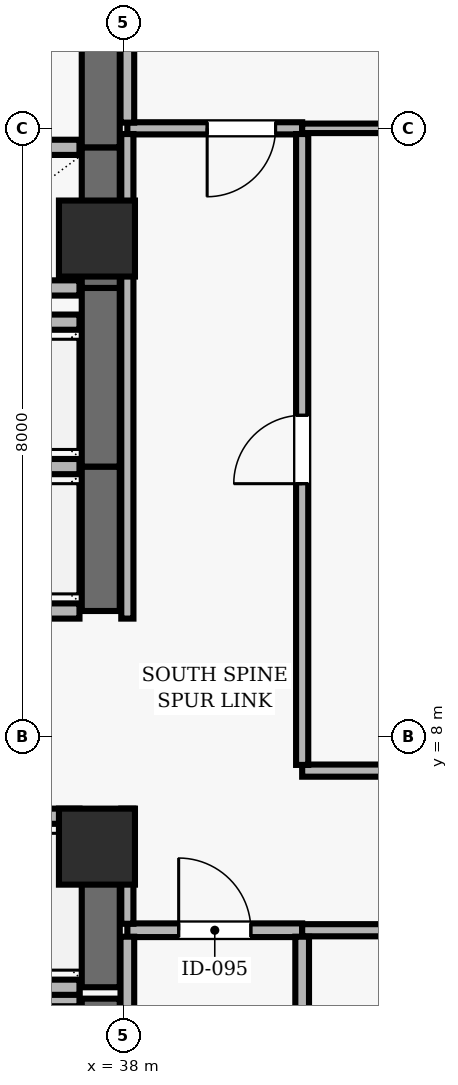
"""IFC4 building model, lengths in metres.
Left out: names, types, materials, properties, quantities, classifications, styles, units other than length and angle.
Written with IfcOpenShell. Run it as: python <this file> out.ifc"""

import sys

from ifc_helpers import new_model, si_unit, direction, frame, frame_2d, origin, origin_2d, place, context, subcontext, project, spatial, rectangle, extrude, element, fill, save


model = new_model("IFC4")
c1 = context("Model", 3, precision=1e-05, world=origin(), true_north=direction((0.0, 1.0)))
c2 = subcontext(c1, "Body", "Model", "MODEL_VIEW")
j1 = project(units=[si_unit("LENGTHUNIT", "METRE"), si_unit("PLANEANGLEUNIT", "RADIAN")], contexts=[c1])
p1 = place(None, origin())
s1 = spatial("IfcSite", under=j1, at=p1, CompositionType="ELEMENT")
p2 = place(p1, origin())
s2 = spatial("IfcBuilding", under=s1, at=p2, CompositionType="ELEMENT")
p3 = place(p2, frame((0.0, 0.0, 203.1)))
s3 = spatial("IfcBuildingStorey", under=s2, at=p3, CompositionType="ELEMENT", Elevation=203.1)
for number, where, z_axis, x_axis in (
    (1, (37.65, 6.55, 0.0), (0.0, 0.0, 1.0), (1.0, 0.0, 0.0)),
    (2, (37.65, 14.55, 0.0), (0.0, 0.0, 1.0), (1.0, 0.0, 0.0)),
):
    element("IfcColumn", number, at=place(p3, frame(where, z_axis=z_axis, x_axis=x_axis)), inside=s3, PredefinedType="COLUMN", context=c2, shape_type="SweptSolid", body=[
        extrude(rectangle(XDim=1.0, YDim=1.0, at=origin_2d()), origin(), (0.0, 0.0, 1.0), 3.9),
    ])
p4 = place(p3, frame((37.7, 2.45, 0.0), z_axis=(0.0, 0.0, 1.0), x_axis=(0.0, 1.0, 0.0)))
e3 = element("IfcWall", 3, at=p4, inside=s3, PredefinedType="SHEAR", context=c2, shape_type="SweptSolid", body=[
    extrude(rectangle(XDim=2.1, YDim=0.5, at=frame_2d((1.05, 0.0))), origin(), (0.0, 0.0, 1.0), 3.69),
])
p5 = place(p3, frame((37.42, 4.55, 0.0), z_axis=(0.0, 0.0, 1.0), x_axis=(-1.0, 0.0, 0.0)))
e4 = element("IfcWall", 4, at=p5, inside=s3, PredefinedType="SOLIDWALL", context=c2, shape_type="SweptSolid", body=[
    extrude(rectangle(XDim=2.14, YDim=0.2, at=frame_2d((1.07, 0.0))), origin(), (0.0, 0.0, 1.0), 3.69),
])
p6 = place(p3, frame((37.7, 4.7, 0.0), z_axis=(0.0, 0.0, 1.0), x_axis=(0.0, 1.0, 0.0)))
e5 = element("IfcWall", 5, at=p6, inside=s3, PredefinedType="SHEAR", context=c2, shape_type="SweptSolid", body=[
    extrude(rectangle(XDim=2.25, YDim=0.5, at=frame_2d((1.125, 0.0))), origin(), (0.0, 0.0, 1.0), 3.69),
])
for number, where, z_axis, x_axis in (
    (6, (35.28, 4.7, 0.0), (0.0, 0.0, 1.0), (1.0, 0.0, 0.0)),
    (7, (37.42, 6.95, 0.0), (0.0, 0.0, 1.0), (-1.0, 0.0, 0.0)),
):
    element("IfcWall", number, at=place(p3, frame(where, z_axis=z_axis, x_axis=x_axis)), inside=s3, PredefinedType="SOLIDWALL", context=c2, shape_type="SweptSolid", body=[
        extrude(rectangle(XDim=2.14, YDim=0.2, at=frame_2d((1.07, 0.0))), origin(), (0.0, 0.0, 1.0), 3.69),
    ])
p7 = place(p3, frame((37.7, 9.65, 0.0), z_axis=(0.0, 0.0, 1.0), x_axis=(0.0, 1.0, 0.0)))
e8 = element("IfcWall", 8, at=p7, inside=s3, PredefinedType="SHEAR", context=c2, shape_type="SweptSolid", body=[
    extrude(rectangle(XDim=1.9, YDim=0.5, at=frame_2d((0.95, 0.0))), origin(), (0.0, 0.0, 1.0), 3.69),
])
for number, where, z_axis, x_axis in (
    (9, (35.28, 9.65, 0.0), (0.0, 0.0, 1.0), (1.0, 0.0, 0.0)),
    (10, (37.42, 11.55, 0.0), (0.0, 0.0, 1.0), (-1.0, 0.0, 0.0)),
):
    element("IfcWall", number, at=place(p3, frame(where, z_axis=z_axis, x_axis=x_axis)), inside=s3, PredefinedType="SOLIDWALL", context=c2, shape_type="SweptSolid", body=[
        extrude(rectangle(XDim=2.14, YDim=0.2, at=frame_2d((1.07, 0.0))), origin(), (0.0, 0.0, 1.0), 3.69),
    ])
p8 = place(p3, frame((37.7, 11.55, 0.0), z_axis=(0.0, 0.0, 1.0), x_axis=(0.0, 1.0, 0.0)))
e11 = element("IfcWall", 11, at=p8, inside=s3, PredefinedType="SHEAR", context=c2, shape_type="SweptSolid", body=[
    extrude(rectangle(XDim=2.35, YDim=0.5, at=frame_2d((1.175, 0.0))), origin(), (0.0, 0.0, 1.0), 3.69),
])
p9 = place(p3, frame((37.42, 13.45, 0.0), z_axis=(0.0, 0.0, 1.0), x_axis=(-1.0, 0.0, 0.0)))
e12 = element("IfcWall", 12, at=p9, inside=s3, PredefinedType="SOLIDWALL", context=c2, shape_type="SweptSolid", body=[
    extrude(rectangle(XDim=2.14, YDim=0.2, at=frame_2d((1.07, 0.0))), origin(), (0.0, 0.0, 1.0), 3.69),
])
p10 = place(p3, frame((37.7, 13.9, 0.0), z_axis=(0.0, 0.0, 1.0), x_axis=(0.0, 1.0, 0.0)))
e13 = element("IfcWall", 13, at=p10, inside=s3, PredefinedType="SHEAR", context=c2, shape_type="SweptSolid", body=[
    extrude(rectangle(XDim=1.85, YDim=0.5, at=frame_2d((0.925, 0.0))), origin(), (0.0, 0.0, 1.0), 3.69),
])
for number, where, z_axis, x_axis in (
    (14, (35.28, 13.9, 0.0), (0.0, 0.0, 1.0), (1.0, 0.0, 0.0)),
    (15, (37.42, 15.75, 0.0), (0.0, 0.0, 1.0), (-1.0, 0.0, 0.0)),
):
    element("IfcWall", number, at=place(p3, frame(where, z_axis=z_axis, x_axis=x_axis)), inside=s3, PredefinedType="SOLIDWALL", context=c2, shape_type="SweptSolid", body=[
        extrude(rectangle(XDim=2.14, YDim=0.2, at=frame_2d((1.07, 0.0))), origin(), (0.0, 0.0, 1.0), 3.69),
    ])
p11 = place(p3, frame((37.7, 15.75, 0.0), z_axis=(0.0, 0.0, 1.0), x_axis=(0.0, 1.0, 0.0)))
e16 = element("IfcWall", 16, at=p11, inside=s3, PredefinedType="SHEAR", context=c2, shape_type="SweptSolid", body=[
    extrude(rectangle(XDim=1.85, YDim=0.5, at=frame_2d((0.925, 0.0))), origin(), (0.0, 0.0, 1.0), 3.69),
])
p12 = place(p3, frame((38.05, 5.45, 0.0), z_axis=(0.0, 0.0, 1.0), x_axis=(1.0, 0.0, 0.0)))
e17 = element("IfcWall", 17, at=p12, inside=s3, PredefinedType="PARTITIONING", context=c2, shape_type="SweptSolid", body=[
    extrude(rectangle(XDim=2.3, YDim=0.18, at=frame_2d((1.15, 0.0))), origin(), (0.0, 0.0, 1.0), 3.372),
])
p13 = place(p12, frame((0.675, 0.0, 0.0)))
e18 = element("IfcOpeningElement", 18, at=p13, cuts=e17, PredefinedType="OPENING", context=c2, shape_type="SweptSolid", body=[
    extrude(rectangle(XDim=0.95, YDim=2.1, at=frame_2d((0.475, 1.05))), frame((0.0, 0.1, 0.0), z_axis=(0.0, -1.0, 0.0), x_axis=(1.0, 0.0, 0.0)), (0.0, 0.0, 1.0), 0.2),
])
p14 = place(p3, frame((40.35, 5.45, 0.0), z_axis=(0.0, 0.0, 1.0), x_axis=(1.0, 0.0, 0.0)))
e19 = element("IfcWall", 19, at=p14, inside=s3, PredefinedType="PARTITIONING", context=c2, shape_type="SweptSolid", body=[
    extrude(rectangle(XDim=5.65, YDim=0.16, at=frame_2d((2.825, 0.0))), origin(), (0.0, 0.0, 1.0), 3.372),
])
p15 = place(p14, frame((2.375, 0.0, 0.0)))
e20 = element("IfcOpeningElement", 20, at=p15, cuts=e19, PredefinedType="OPENING", context=c2, shape_type="SweptSolid", body=[
    extrude(rectangle(XDim=0.9, YDim=2.1, at=frame_2d((0.45, 1.05))), frame((0.0, 0.09, 0.0), z_axis=(0.0, -1.0, 0.0), x_axis=(1.0, 0.0, 0.0)), (0.0, 0.0, 1.0), 0.18),
])
p16 = place(p3, frame((40.35, 16.0, 0.0), z_axis=(0.0, 0.0, 1.0), x_axis=(-1.0, 0.0, 0.0)))
e21 = element("IfcWall", 21, at=p16, inside=s3, PredefinedType="PARTITIONING", context=c2, shape_type="SweptSolid", body=[
    extrude(rectangle(XDim=2.3, YDim=0.16, at=frame_2d((1.15, 0.0))), origin(), (0.0, 0.0, 1.0), 3.39),
])
p17 = place(p16, frame((0.35, 0.0, 0.0)))
e22 = element("IfcOpeningElement", 22, at=p17, cuts=e21, PredefinedType="OPENING", context=c2, shape_type="SweptSolid", body=[
    extrude(rectangle(XDim=0.9, YDim=2.1, at=frame_2d((0.45, 1.05))), frame((0.0, 0.09, 0.0), z_axis=(0.0, -1.0, 0.0), x_axis=(1.0, 0.0, 0.0)), (0.0, 0.0, 1.0), 0.18),
])
p18 = place(p3, frame((46.0, 7.55, 0.0), z_axis=(0.0, 0.0, 1.0), x_axis=(-1.0, 0.0, 0.0)))
e23 = element("IfcWall", 23, at=p18, inside=s3, PredefinedType="PARTITIONING", context=c2, shape_type="SweptSolid", body=[
    extrude(rectangle(XDim=5.65, YDim=0.16, at=frame_2d((2.825, 0.0))), origin(), (0.0, 0.0, 1.0), 3.146),
])
p19 = place(p3, frame((46.0, 16.0, 0.0), z_axis=(0.0, 0.0, 1.0), x_axis=(-1.0, 0.0, 0.0)))
e24 = element("IfcWall", 24, at=p19, inside=s3, PredefinedType="PARTITIONING", context=c2, shape_type="SweptSolid", body=[
    extrude(rectangle(XDim=5.65, YDim=0.125, at=frame_2d((2.825, 0.0))), origin(), (0.0, 0.0, 1.0), 3.39),
])
p20 = place(p3, frame((38.05, 5.365, 0.0), z_axis=(0.0, 0.0, 1.0), x_axis=(0.0, -1.0, 0.0)))
e25 = element("IfcWall", 25, at=p20, inside=s3, PredefinedType="PARTITIONING", context=c2, shape_type="SweptSolid", body=[
    extrude(rectangle(XDim=5.22, YDim=0.18, at=frame_2d((2.61, 0.0))), origin(), (0.0, 0.0, 1.0), 3.146),
])
p21 = place(p3, frame((38.05, 7.05, 0.0), z_axis=(0.0, 0.0, 1.0), x_axis=(0.0, -1.0, 0.0)))
e26 = element("IfcWall", 26, at=p21, inside=s3, PredefinedType="PARTITIONING", context=c2, shape_type="SweptSolid", body=[
    extrude(rectangle(XDim=1.515, YDim=0.16, at=frame_2d((0.758, 0.0))), origin(), (0.0, 0.0, 1.0), 3.146),
])
p22 = place(p3, frame((38.05, 15.925, 0.0), z_axis=(0.0, 0.0, 1.0), x_axis=(0.0, -1.0, 0.0)))
e27 = element("IfcWall", 27, at=p22, inside=s3, PredefinedType="PARTITIONING", context=c2, shape_type="SweptSolid", body=[
    extrude(rectangle(XDim=6.375, YDim=0.16, at=frame_2d((3.188, 0.0))), origin(), (0.0, 0.0, 1.0), 3.146),
])
p23 = place(p3, frame((38.05, 23.19, 0.0), z_axis=(0.0, 0.0, 1.0), x_axis=(0.0, -1.0, 0.0)))
e28 = element("IfcWall", 28, at=p23, inside=s3, PredefinedType="PARTITIONING", context=c2, shape_type="SweptSolid", body=[
    extrude(rectangle(XDim=7.115, YDim=0.18, at=frame_2d((3.558, 0.0))), origin(), (0.0, 0.0, 1.0), 3.146),
])
p24 = place(p3, frame((40.35, 0.145, 0.0), z_axis=(0.0, 0.0, 1.0), x_axis=(0.0, 1.0, 0.0)))
e29 = element("IfcWall", 29, at=p24, inside=s3, PredefinedType="PARTITIONING", context=c2, shape_type="SweptSolid", body=[
    extrude(rectangle(XDim=5.22, YDim=0.18, at=frame_2d((2.61, 0.0))), origin(), (0.0, 0.0, 1.0), 3.69),
])
p25 = place(p3, frame((40.35, 7.625, 0.0), z_axis=(0.0, 0.0, 1.0), x_axis=(0.0, 1.0, 0.0)))
e30 = element("IfcWall", 30, at=p25, inside=s3, PredefinedType="PARTITIONING", context=c2, shape_type="SweptSolid", body=[
    extrude(rectangle(XDim=8.3, YDim=0.16, at=frame_2d((4.15, 0.0))), origin(), (0.0, 0.0, 1.0), 3.372),
])
p26 = place(p25, frame((3.7, 0.0, 0.0)))
e31 = element("IfcOpeningElement", 31, at=p26, cuts=e30, PredefinedType="OPENING", context=c2, shape_type="SweptSolid", body=[
    extrude(rectangle(XDim=0.9, YDim=2.1, at=frame_2d((0.45, 1.05))), frame((0.0, 0.09, 0.0), z_axis=(0.0, -1.0, 0.0), x_axis=(1.0, 0.0, 0.0)), (0.0, 0.0, 1.0), 0.18),
])
p27 = place(p13, origin())
e32 = element("IfcDoor", 32, at=p27, inside=s3, OperationType="SINGLE_SWING_LEFT", PredefinedType="DOOR", context=c2, shape_type="SweptSolid", body=[
    extrude(rectangle(XDim=0.95, YDim=2.1, at=frame_2d((0.475, 1.05))), frame((0.0, 0.025, 0.0), z_axis=(0.0, -1.0, 0.0), x_axis=(1.0, 0.0, 0.0)), (0.0, 0.0, 1.0), 0.05),
])
fill(e18, e32)
p28 = place(p26, origin())
e33 = element("IfcDoor", 33, at=p28, inside=s3, OperationType="SINGLE_SWING_LEFT", PredefinedType="DOOR", context=c2, shape_type="SweptSolid", body=[
    extrude(rectangle(XDim=0.9, YDim=2.1, at=frame_2d((0.45, 1.05))), frame((0.0, 0.025, 0.0), z_axis=(0.0, -1.0, 0.0), x_axis=(1.0, 0.0, 0.0)), (0.0, 0.0, 1.0), 0.05),
])
fill(e31, e33)
p29 = place(p17, origin())
e34 = element("IfcDoor", 34, at=p29, inside=s3, OperationType="SINGLE_SWING_RIGHT", PredefinedType="DOOR", context=c2, shape_type="SweptSolid", body=[
    extrude(rectangle(XDim=0.9, YDim=2.1, at=frame_2d((0.45, 1.05))), frame((0.0, 0.025, 0.0), z_axis=(0.0, -1.0, 0.0), x_axis=(1.0, 0.0, 0.0)), (0.0, 0.0, 1.0), 0.05),
])
fill(e22, e34)
save(model, sys.argv[1])
